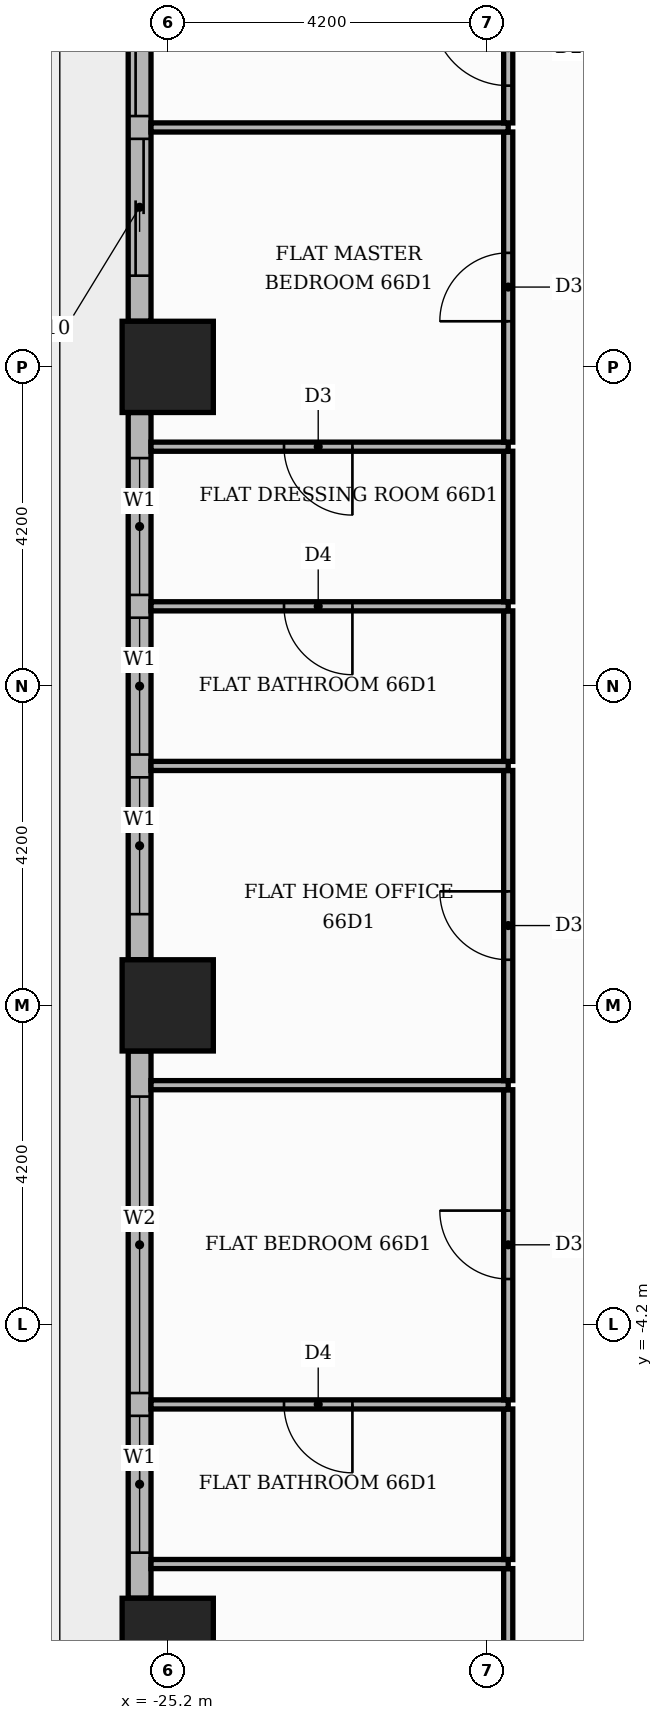
"""IFC4 building model, lengths in metres.
Left out: names, types, materials, properties, quantities, classifications, styles, units other than length and angle.
Written with IfcOpenShell. Run it as: python <this file> out.ifc"""

import sys

from ifc_helpers import new_model, si_unit, direction, frame, frame_2d, origin, origin_2d, place, context, subcontext, project, spatial, rectangle, extrude, element, fill, save


model = new_model("IFC4")
c1 = context("Model", 3, precision=1e-05, world=origin(), true_north=direction((0.0, 1.0)))
c2 = subcontext(c1, "Body", "Model", "MODEL_VIEW")
j1 = project(units=[si_unit("LENGTHUNIT", "METRE"), si_unit("PLANEANGLEUNIT", "RADIAN")], contexts=[c1])
p1 = place(None, origin())
s1 = spatial("IfcSite", under=j1, at=p1, CompositionType="ELEMENT")
p2 = place(p1, origin())
s2 = spatial("IfcBuilding", under=s1, at=p2, CompositionType="ELEMENT")
p3 = place(p2, frame((0.0, 0.0, 275.7)))
s3 = spatial("IfcBuildingStorey", under=s2, at=p3, CompositionType="ELEMENT", Elevation=275.7)
for number, where, z_axis, x_axis in (
    (1, (-25.2, 0.0, 0.0), (0.0, 0.0, 1.0), (1.0, 0.0, 0.0)),
    (2, (-25.2, -8.4, 0.0), (0.0, 0.0, 1.0), (1.0, 0.0, 0.0)),
    (3, (-25.2, 8.4, 0.0), (0.0, 0.0, 1.0), (1.0, 0.0, 0.0)),
):
    element("IfcColumn", number, at=place(p3, frame(where, z_axis=z_axis, x_axis=x_axis)), inside=s3, PredefinedType="COLUMN", context=c2, shape_type="SweptSolid", body=[
        extrude(rectangle(XDim=1.2, YDim=1.2, at=origin_2d()), origin(), (0.0, 0.0, 1.0), 3.9),
    ])
p4 = place(p3, frame((-25.57, 16.2, 0.0), z_axis=(0.0, 0.0, 1.0), x_axis=(0.0, -1.0, 0.0)))
e4 = element("IfcWall", 4, at=p4, inside=s3, PredefinedType="STANDARD", context=c2, shape_type="SweptSolid", body=[
    extrude(rectangle(XDim=7.2, YDim=0.3, at=frame_2d((3.6, 0.0))), origin(), (0.0, 0.0, 1.0), 3.48),
])
p5 = place(p4, frame((0.6, 0.0, 0.0)))
e5 = element("IfcOpeningElement", 5, at=p5, cuts=e4, PredefinedType="OPENING", context=c2, shape_type="SweptSolid", body=[
    extrude(rectangle(XDim=3.9, YDim=2.4, at=frame_2d((1.95, 1.2))), frame((0.0, 0.16, 0.0), z_axis=(0.0, -1.0, 0.0), x_axis=(1.0, 0.0, 0.0)), (0.0, 0.0, 1.0), 0.32),
])
p6 = place(p4, frame((4.8, 0.0, 0.0)))
e6 = element("IfcOpeningElement", 6, at=p6, cuts=e4, PredefinedType="OPENING", context=c2, shape_type="SweptSolid", body=[
    extrude(rectangle(XDim=1.8, YDim=2.4, at=frame_2d((0.9, 1.2))), frame((0.0, 0.16, 0.0), z_axis=(0.0, -1.0, 0.0), x_axis=(1.0, 0.0, 0.0)), (0.0, 0.0, 1.0), 0.32),
])
p7 = place(p3, frame((-25.57, 7.8, 0.0), z_axis=(0.0, 0.0, 1.0), x_axis=(0.0, -1.0, 0.0)))
e7 = element("IfcWall", 7, at=p7, inside=s3, PredefinedType="STANDARD", context=c2, shape_type="SweptSolid", body=[
    extrude(rectangle(XDim=7.2, YDim=0.3, at=frame_2d((3.6, 0.0))), origin(), (0.0, 0.0, 1.0), 3.48),
])
p8 = place(p7, frame((0.6, 0.0, 0.9)))
e8 = element("IfcOpeningElement", 8, at=p8, cuts=e7, PredefinedType="OPENING", context=c2, shape_type="SweptSolid", body=[
    extrude(rectangle(XDim=1.8, YDim=2.1, at=frame_2d((0.9, 1.05))), frame((0.0, 0.16, 0.0), z_axis=(0.0, -1.0, 0.0), x_axis=(1.0, 0.0, 0.0)), (0.0, 0.0, 1.0), 0.32),
])
p9 = place(p7, frame((2.7, 0.0, 0.9)))
e9 = element("IfcOpeningElement", 9, at=p9, cuts=e7, PredefinedType="OPENING", context=c2, shape_type="SweptSolid", body=[
    extrude(rectangle(XDim=1.8, YDim=2.1, at=frame_2d((0.9, 1.05))), frame((0.0, 0.16, 0.0), z_axis=(0.0, -1.0, 0.0), x_axis=(1.0, 0.0, 0.0)), (0.0, 0.0, 1.0), 0.32),
])
p10 = place(p7, frame((4.8, 0.0, 0.9)))
e10 = element("IfcOpeningElement", 10, at=p10, cuts=e7, PredefinedType="OPENING", context=c2, shape_type="SweptSolid", body=[
    extrude(rectangle(XDim=1.8, YDim=2.1, at=frame_2d((0.9, 1.05))), frame((0.0, 0.16, 0.0), z_axis=(0.0, -1.0, 0.0), x_axis=(1.0, 0.0, 0.0)), (0.0, 0.0, 1.0), 0.32),
])
p11 = place(p3, frame((-25.57, -0.6, 0.0), z_axis=(0.0, 0.0, 1.0), x_axis=(0.0, -1.0, 0.0)))
e11 = element("IfcWall", 11, at=p11, inside=s3, PredefinedType="STANDARD", context=c2, shape_type="SweptSolid", body=[
    extrude(rectangle(XDim=7.2, YDim=0.3, at=frame_2d((3.6, 0.0))), origin(), (0.0, 0.0, 1.0), 3.48),
])
p12 = place(p11, frame((0.6, 0.0, 0.9)))
e12 = element("IfcOpeningElement", 12, at=p12, cuts=e11, PredefinedType="OPENING", context=c2, shape_type="SweptSolid", body=[
    extrude(rectangle(XDim=3.9, YDim=2.1, at=frame_2d((1.95, 1.05))), frame((0.0, 0.16, 0.0), z_axis=(0.0, -1.0, 0.0), x_axis=(1.0, 0.0, 0.0)), (0.0, 0.0, 1.0), 0.32),
])
p13 = place(p11, frame((4.8, 0.0, 0.9)))
e13 = element("IfcOpeningElement", 13, at=p13, cuts=e11, PredefinedType="OPENING", context=c2, shape_type="SweptSolid", body=[
    extrude(rectangle(XDim=1.8, YDim=2.1, at=frame_2d((0.9, 1.05))), frame((0.0, 0.16, 0.0), z_axis=(0.0, -1.0, 0.0), x_axis=(1.0, 0.0, 0.0)), (0.0, 0.0, 1.0), 0.32),
])
p14 = place(p3, frame((-20.72, -11.49, 0.0), z_axis=(0.0, 0.0, 1.0), x_axis=(0.0, 1.0, 0.0)))
e14 = element("IfcWall", 14, at=p14, inside=s3, PredefinedType="PARTITIONING", context=c2, shape_type="SweptSolid", body=[
    extrude(rectangle(XDim=4.08, YDim=0.12, at=frame_2d((2.04, 0.0))), origin(), (0.0, 0.0, 1.0), 3.48),
])
p15 = place(p14, frame((1.59, 0.0, 0.0)))
e15 = element("IfcOpeningElement", 15, at=p15, cuts=e14, PredefinedType="OPENING", context=c2, shape_type="SweptSolid", body=[
    extrude(rectangle(XDim=0.9, YDim=2.1, at=frame_2d((0.45, 1.05))), frame((0.0, 0.07, 0.0), z_axis=(0.0, -1.0, 0.0), x_axis=(1.0, 0.0, 0.0)), (0.0, 0.0, 1.0), 0.14),
])
p16 = place(p3, frame((-25.42, -7.35, 0.0), z_axis=(0.0, 0.0, 1.0), x_axis=(1.0, 0.0, 0.0)))
e16 = element("IfcWall", 16, at=p16, inside=s3, PredefinedType="PARTITIONING", context=c2, shape_type="SweptSolid", body=[
    extrude(rectangle(XDim=4.7, YDim=0.12, at=frame_2d((2.35, 0.0))), origin(), (0.0, 0.0, 1.0), 3.48),
])
p17 = place(p3, frame((-20.72, -7.29, 0.0), z_axis=(0.0, 0.0, 1.0), x_axis=(0.0, 1.0, 0.0)))
e17 = element("IfcWall", 17, at=p17, inside=s3, PredefinedType="PARTITIONING", context=c2, shape_type="SweptSolid", body=[
    extrude(rectangle(XDim=1.98, YDim=0.12, at=frame_2d((0.99, 0.0))), origin(), (0.0, 0.0, 1.0), 3.48),
])
p18 = place(p3, frame((-25.42, -5.25, 0.0), z_axis=(0.0, 0.0, 1.0), x_axis=(1.0, 0.0, 0.0)))
e18 = element("IfcWall", 18, at=p18, inside=s3, PredefinedType="PARTITIONING", context=c2, shape_type="SweptSolid", body=[
    extrude(rectangle(XDim=4.7, YDim=0.12, at=frame_2d((2.35, 0.0))), origin(), (0.0, 0.0, 1.0), 3.48),
])
p19 = place(p18, frame((1.75, 0.0, 0.0)))
e19 = element("IfcOpeningElement", 19, at=p19, cuts=e18, PredefinedType="OPENING", context=c2, shape_type="SweptSolid", body=[
    extrude(rectangle(XDim=0.9, YDim=2.1, at=frame_2d((0.45, 1.05))), frame((0.0, 0.07, 0.0), z_axis=(0.0, -1.0, 0.0), x_axis=(1.0, 0.0, 0.0)), (0.0, 0.0, 1.0), 0.14),
])
p20 = place(p3, frame((-20.72, -5.19, 0.0), z_axis=(0.0, 0.0, 1.0), x_axis=(0.0, 1.0, 0.0)))
e20 = element("IfcWall", 20, at=p20, inside=s3, PredefinedType="PARTITIONING", context=c2, shape_type="SweptSolid", body=[
    extrude(rectangle(XDim=4.08, YDim=0.12, at=frame_2d((2.04, 0.0))), origin(), (0.0, 0.0, 1.0), 3.48),
])
p21 = place(p20, frame((1.59, 0.0, 0.0)))
e21 = element("IfcOpeningElement", 21, at=p21, cuts=e20, PredefinedType="OPENING", context=c2, shape_type="SweptSolid", body=[
    extrude(rectangle(XDim=0.9, YDim=2.1, at=frame_2d((0.45, 1.05))), frame((0.0, 0.07, 0.0), z_axis=(0.0, -1.0, 0.0), x_axis=(1.0, 0.0, 0.0)), (0.0, 0.0, 1.0), 0.14),
])
p22 = place(p3, frame((-25.42, -1.05, 0.0), z_axis=(0.0, 0.0, 1.0), x_axis=(1.0, 0.0, 0.0)))
e22 = element("IfcWall", 22, at=p22, inside=s3, PredefinedType="PARTITIONING", context=c2, shape_type="SweptSolid", body=[
    extrude(rectangle(XDim=4.7, YDim=0.12, at=frame_2d((2.35, 0.0))), origin(), (0.0, 0.0, 1.0), 3.48),
])
p23 = place(p3, frame((-20.72, -0.99, 0.0), z_axis=(0.0, 0.0, 1.0), x_axis=(0.0, 1.0, 0.0)))
e23 = element("IfcWall", 23, at=p23, inside=s3, PredefinedType="PARTITIONING", context=c2, shape_type="SweptSolid", body=[
    extrude(rectangle(XDim=4.08, YDim=0.12, at=frame_2d((2.04, 0.0))), origin(), (0.0, 0.0, 1.0), 3.48),
])
p24 = place(p23, frame((1.59, 0.0, 0.0)))
e24 = element("IfcOpeningElement", 24, at=p24, cuts=e23, PredefinedType="OPENING", context=c2, shape_type="SweptSolid", body=[
    extrude(rectangle(XDim=0.9, YDim=2.1, at=frame_2d((0.45, 1.05))), frame((0.0, 0.07, 0.0), z_axis=(0.0, -1.0, 0.0), x_axis=(1.0, 0.0, 0.0)), (0.0, 0.0, 1.0), 0.14),
])
p25 = place(p3, frame((-25.42, 3.15, 0.0), z_axis=(0.0, 0.0, 1.0), x_axis=(1.0, 0.0, 0.0)))
e25 = element("IfcWall", 25, at=p25, inside=s3, PredefinedType="PARTITIONING", context=c2, shape_type="SweptSolid", body=[
    extrude(rectangle(XDim=4.7, YDim=0.12, at=frame_2d((2.35, 0.0))), origin(), (0.0, 0.0, 1.0), 3.48),
])
p26 = place(p3, frame((-20.72, 3.21, 0.0), z_axis=(0.0, 0.0, 1.0), x_axis=(0.0, 1.0, 0.0)))
e26 = element("IfcWall", 26, at=p26, inside=s3, PredefinedType="PARTITIONING", context=c2, shape_type="SweptSolid", body=[
    extrude(rectangle(XDim=1.98, YDim=0.12, at=frame_2d((0.99, 0.0))), origin(), (0.0, 0.0, 1.0), 3.48),
])
p27 = place(p3, frame((-25.42, 5.25, 0.0), z_axis=(0.0, 0.0, 1.0), x_axis=(1.0, 0.0, 0.0)))
e27 = element("IfcWall", 27, at=p27, inside=s3, PredefinedType="PARTITIONING", context=c2, shape_type="SweptSolid", body=[
    extrude(rectangle(XDim=4.7, YDim=0.12, at=frame_2d((2.35, 0.0))), origin(), (0.0, 0.0, 1.0), 3.48),
])
p28 = place(p27, frame((1.75, 0.0, 0.0)))
e28 = element("IfcOpeningElement", 28, at=p28, cuts=e27, PredefinedType="OPENING", context=c2, shape_type="SweptSolid", body=[
    extrude(rectangle(XDim=0.9, YDim=2.1, at=frame_2d((0.45, 1.05))), frame((0.0, 0.07, 0.0), z_axis=(0.0, -1.0, 0.0), x_axis=(1.0, 0.0, 0.0)), (0.0, 0.0, 1.0), 0.14),
])
p29 = place(p3, frame((-20.72, 5.31, 0.0), z_axis=(0.0, 0.0, 1.0), x_axis=(0.0, 1.0, 0.0)))
e29 = element("IfcWall", 29, at=p29, inside=s3, PredefinedType="PARTITIONING", context=c2, shape_type="SweptSolid", body=[
    extrude(rectangle(XDim=1.98, YDim=0.12, at=frame_2d((0.99, 0.0))), origin(), (0.0, 0.0, 1.0), 3.48),
])
p30 = place(p3, frame((-25.42, 7.35, 0.0), z_axis=(0.0, 0.0, 1.0), x_axis=(1.0, 0.0, 0.0)))
e30 = element("IfcWall", 30, at=p30, inside=s3, PredefinedType="PARTITIONING", context=c2, shape_type="SweptSolid", body=[
    extrude(rectangle(XDim=4.7, YDim=0.12, at=frame_2d((2.35, 0.0))), origin(), (0.0, 0.0, 1.0), 3.48),
])
p31 = place(p30, frame((1.75, 0.0, 0.0)))
e31 = element("IfcOpeningElement", 31, at=p31, cuts=e30, PredefinedType="OPENING", context=c2, shape_type="SweptSolid", body=[
    extrude(rectangle(XDim=0.9, YDim=2.1, at=frame_2d((0.45, 1.05))), frame((0.0, 0.07, 0.0), z_axis=(0.0, -1.0, 0.0), x_axis=(1.0, 0.0, 0.0)), (0.0, 0.0, 1.0), 0.14),
])
p32 = place(p3, frame((-20.72, 7.41, 0.0), z_axis=(0.0, 0.0, 1.0), x_axis=(0.0, 1.0, 0.0)))
e32 = element("IfcWall", 32, at=p32, inside=s3, PredefinedType="PARTITIONING", context=c2, shape_type="SweptSolid", body=[
    extrude(rectangle(XDim=4.08, YDim=0.12, at=frame_2d((2.04, 0.0))), origin(), (0.0, 0.0, 1.0), 3.48),
])
p33 = place(p32, frame((1.59, 0.0, 0.0)))
e33 = element("IfcOpeningElement", 33, at=p33, cuts=e32, PredefinedType="OPENING", context=c2, shape_type="SweptSolid", body=[
    extrude(rectangle(XDim=0.9, YDim=2.1, at=frame_2d((0.45, 1.05))), frame((0.0, 0.07, 0.0), z_axis=(0.0, -1.0, 0.0), x_axis=(1.0, 0.0, 0.0)), (0.0, 0.0, 1.0), 0.14),
])
p34 = place(p3, frame((-25.42, 11.55, 0.0), z_axis=(0.0, 0.0, 1.0), x_axis=(1.0, 0.0, 0.0)))
e34 = element("IfcWall", 34, at=p34, inside=s3, PredefinedType="PARTITIONING", context=c2, shape_type="SweptSolid", body=[
    extrude(rectangle(XDim=4.7, YDim=0.12, at=frame_2d((2.35, 0.0))), origin(), (0.0, 0.0, 1.0), 3.48),
])
p35 = place(p3, frame((-20.72, 11.61, 0.0), z_axis=(0.0, 0.0, 1.0), x_axis=(0.0, 1.0, 0.0)))
e35 = element("IfcWall", 35, at=p35, inside=s3, PredefinedType="PARTITIONING", context=c2, shape_type="SweptSolid", body=[
    extrude(rectangle(XDim=1.98, YDim=0.12, at=frame_2d((0.99, 0.0))), origin(), (0.0, 0.0, 1.0), 3.48),
])
p36 = place(p35, frame((0.49, 0.0, 0.0)))
e36 = element("IfcOpeningElement", 36, at=p36, cuts=e35, PredefinedType="OPENING", context=c2, shape_type="SweptSolid", body=[
    extrude(rectangle(XDim=1.0, YDim=2.1, at=frame_2d((0.5, 1.05))), frame((0.0, 0.07, 0.0), z_axis=(0.0, -1.0, 0.0), x_axis=(1.0, 0.0, 0.0)), (0.0, 0.0, 1.0), 0.14),
])
p37 = place(p5, origin())
e37 = element("IfcDoor", 37, at=p37, inside=s3, OperationType="SLIDING_TO_LEFT", PredefinedType="DOOR", context=c2, shape_type="SweptSolid", body=[
    extrude(rectangle(XDim=3.9, YDim=2.4, at=frame_2d((1.95, 1.2))), frame((0.0, 0.025, 0.0), z_axis=(0.0, -1.0, 0.0), x_axis=(1.0, 0.0, 0.0)), (0.0, 0.0, 1.0), 0.05),
])
fill(e5, e37)
p38 = place(p6, origin())
e38 = element("IfcDoor", 38, at=p38, inside=s3, OperationType="SLIDING_TO_RIGHT", PredefinedType="DOOR", context=c2, shape_type="SweptSolid", body=[
    extrude(rectangle(XDim=1.8, YDim=2.4, at=frame_2d((0.9, 1.2))), frame((0.0, 0.025, 0.0), z_axis=(0.0, -1.0, 0.0), x_axis=(1.0, 0.0, 0.0)), (0.0, 0.0, 1.0), 0.05),
])
fill(e6, e38)
p39 = place(p8, origin())
e39 = element("IfcWindow", 39, at=p39, inside=s3, PartitioningType="SINGLE_PANEL", PredefinedType="WINDOW", context=c2, shape_type="SweptSolid", body=[
    extrude(rectangle(XDim=1.8, YDim=2.1, at=frame_2d((0.9, 1.05))), frame((0.0, 0.03, 0.0), z_axis=(0.0, -1.0, 0.0), x_axis=(1.0, 0.0, 0.0)), (0.0, 0.0, 1.0), 0.06),
])
fill(e8, e39)
p40 = place(p9, origin())
e40 = element("IfcWindow", 40, at=p40, inside=s3, PartitioningType="SINGLE_PANEL", PredefinedType="WINDOW", context=c2, shape_type="SweptSolid", body=[
    extrude(rectangle(XDim=1.8, YDim=2.1, at=frame_2d((0.9, 1.05))), frame((0.0, 0.03, 0.0), z_axis=(0.0, -1.0, 0.0), x_axis=(1.0, 0.0, 0.0)), (0.0, 0.0, 1.0), 0.06),
])
fill(e9, e40)
p41 = place(p10, origin())
e41 = element("IfcWindow", 41, at=p41, inside=s3, PartitioningType="SINGLE_PANEL", PredefinedType="WINDOW", context=c2, shape_type="SweptSolid", body=[
    extrude(rectangle(XDim=1.8, YDim=2.1, at=frame_2d((0.9, 1.05))), frame((0.0, 0.03, 0.0), z_axis=(0.0, -1.0, 0.0), x_axis=(1.0, 0.0, 0.0)), (0.0, 0.0, 1.0), 0.06),
])
fill(e10, e41)
p42 = place(p12, origin())
e42 = element("IfcWindow", 42, at=p42, inside=s3, PartitioningType="SINGLE_PANEL", PredefinedType="WINDOW", context=c2, shape_type="SweptSolid", body=[
    extrude(rectangle(XDim=3.9, YDim=2.1, at=frame_2d((1.95, 1.05))), frame((0.0, 0.03, 0.0), z_axis=(0.0, -1.0, 0.0), x_axis=(1.0, 0.0, 0.0)), (0.0, 0.0, 1.0), 0.06),
])
fill(e12, e42)
p43 = place(p13, origin())
e43 = element("IfcWindow", 43, at=p43, inside=s3, PartitioningType="SINGLE_PANEL", PredefinedType="WINDOW", context=c2, shape_type="SweptSolid", body=[
    extrude(rectangle(XDim=1.8, YDim=2.1, at=frame_2d((0.9, 1.05))), frame((0.0, 0.03, 0.0), z_axis=(0.0, -1.0, 0.0), x_axis=(1.0, 0.0, 0.0)), (0.0, 0.0, 1.0), 0.06),
])
fill(e13, e43)
p44 = place(p36, origin())
e44 = element("IfcDoor", 44, at=p44, inside=s3, OperationType="SINGLE_SWING_RIGHT", PredefinedType="DOOR", context=c2, shape_type="SweptSolid", body=[
    extrude(rectangle(XDim=1.0, YDim=2.1, at=frame_2d((0.5, 1.05))), frame((0.0, 0.025, 0.0), z_axis=(0.0, -1.0, 0.0), x_axis=(1.0, 0.0, 0.0)), (0.0, 0.0, 1.0), 0.05),
])
fill(e36, e44)
p45 = place(p33, origin())
e45 = element("IfcDoor", 45, at=p45, inside=s3, OperationType="SINGLE_SWING_LEFT", PredefinedType="DOOR", context=c2, shape_type="SweptSolid", body=[
    extrude(rectangle(XDim=0.9, YDim=2.1, at=frame_2d((0.45, 1.05))), frame((0.0, 0.025, 0.0), z_axis=(0.0, -1.0, 0.0), x_axis=(1.0, 0.0, 0.0)), (0.0, 0.0, 1.0), 0.05),
])
fill(e33, e45)
p46 = place(p31, frame((0.9, 0.0, 0.0), z_axis=(0.0, 0.0, 1.0), x_axis=(-1.0, 0.0, 0.0)))
e46 = element("IfcDoor", 46, at=p46, inside=s3, OperationType="SINGLE_SWING_RIGHT", PredefinedType="DOOR", context=c2, shape_type="SweptSolid", body=[
    extrude(rectangle(XDim=0.9, YDim=2.1, at=frame_2d((0.45, 1.05))), frame((0.0, 0.025, 0.0), z_axis=(0.0, -1.0, 0.0), x_axis=(1.0, 0.0, 0.0)), (0.0, 0.0, 1.0), 0.05),
])
fill(e31, e46)
p47 = place(p28, frame((0.9, 0.0, 0.0), z_axis=(0.0, 0.0, 1.0), x_axis=(-1.0, 0.0, 0.0)))
e47 = element("IfcDoor", 47, at=p47, inside=s3, OperationType="SINGLE_SWING_RIGHT", PredefinedType="DOOR", context=c2, shape_type="SweptSolid", body=[
    extrude(rectangle(XDim=0.9, YDim=2.1, at=frame_2d((0.45, 1.05))), frame((0.0, 0.025, 0.0), z_axis=(0.0, -1.0, 0.0), x_axis=(1.0, 0.0, 0.0)), (0.0, 0.0, 1.0), 0.05),
])
fill(e28, e47)
p48 = place(p24, origin())
e48 = element("IfcDoor", 48, at=p48, inside=s3, OperationType="SINGLE_SWING_RIGHT", PredefinedType="DOOR", context=c2, shape_type="SweptSolid", body=[
    extrude(rectangle(XDim=0.9, YDim=2.1, at=frame_2d((0.45, 1.05))), frame((0.0, 0.025, 0.0), z_axis=(0.0, -1.0, 0.0), x_axis=(1.0, 0.0, 0.0)), (0.0, 0.0, 1.0), 0.05),
])
fill(e24, e48)
p49 = place(p21, origin())
e49 = element("IfcDoor", 49, at=p49, inside=s3, OperationType="SINGLE_SWING_RIGHT", PredefinedType="DOOR", context=c2, shape_type="SweptSolid", body=[
    extrude(rectangle(XDim=0.9, YDim=2.1, at=frame_2d((0.45, 1.05))), frame((0.0, 0.025, 0.0), z_axis=(0.0, -1.0, 0.0), x_axis=(1.0, 0.0, 0.0)), (0.0, 0.0, 1.0), 0.05),
])
fill(e21, e49)
p50 = place(p19, frame((0.9, 0.0, 0.0), z_axis=(0.0, 0.0, 1.0), x_axis=(-1.0, 0.0, 0.0)))
e50 = element("IfcDoor", 50, at=p50, inside=s3, OperationType="SINGLE_SWING_RIGHT", PredefinedType="DOOR", context=c2, shape_type="SweptSolid", body=[
    extrude(rectangle(XDim=0.9, YDim=2.1, at=frame_2d((0.45, 1.05))), frame((0.0, 0.025, 0.0), z_axis=(0.0, -1.0, 0.0), x_axis=(1.0, 0.0, 0.0)), (0.0, 0.0, 1.0), 0.05),
])
fill(e19, e50)
save(model, sys.argv[1])
